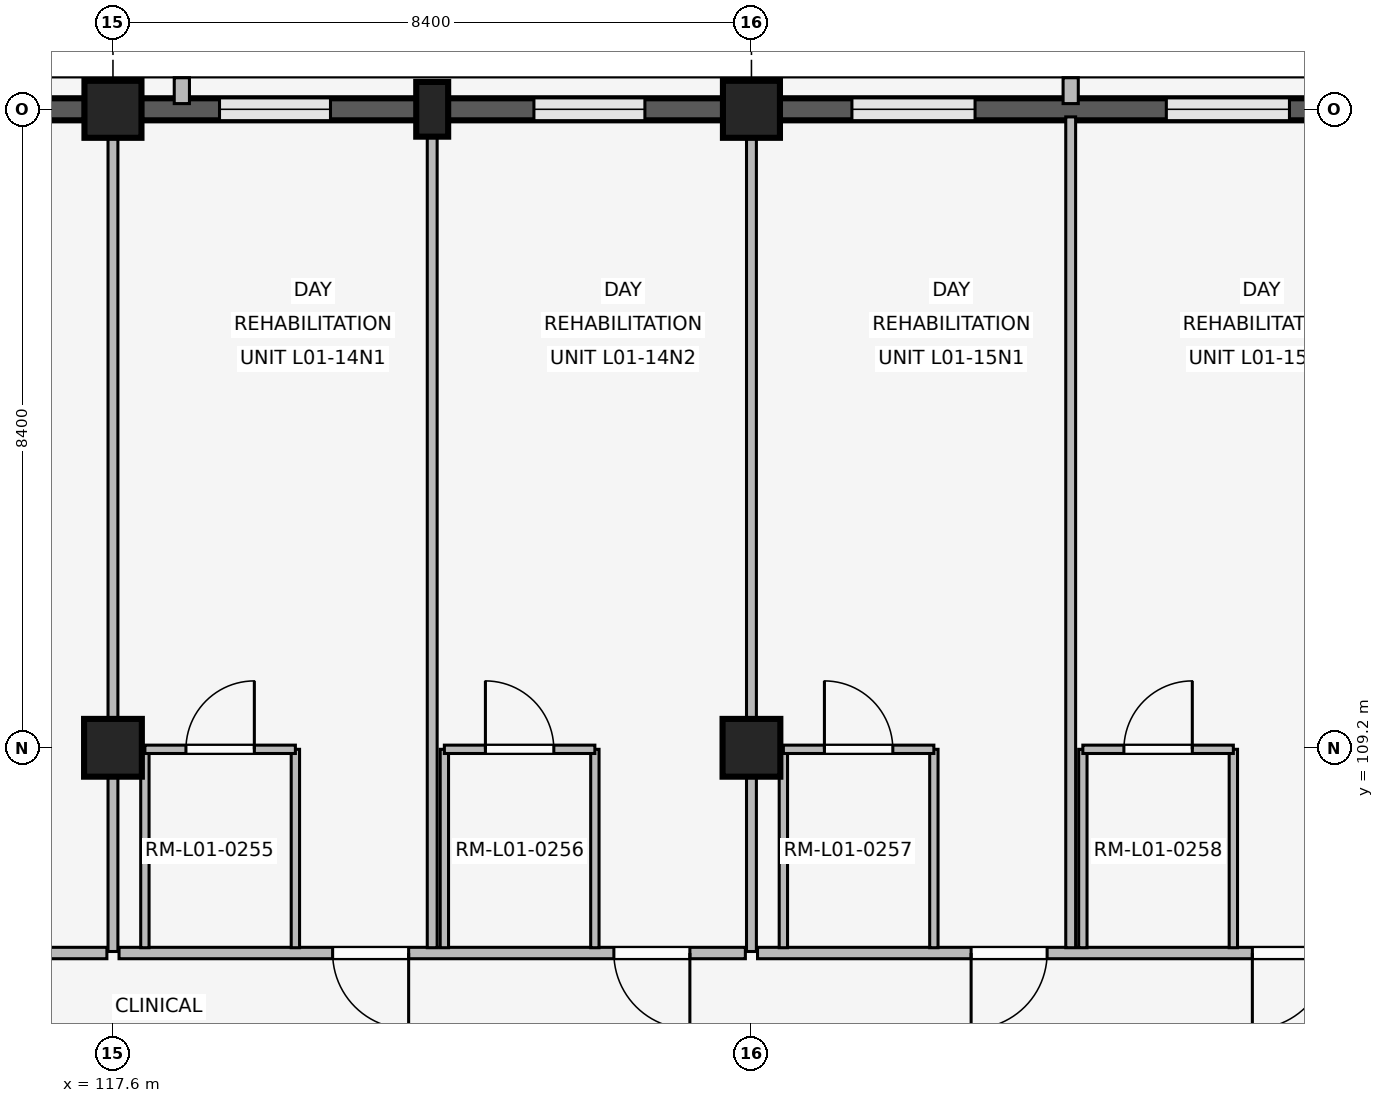
"""IFC4 building model, lengths in metres.
Left out: names, types, materials, properties, quantities, classifications, styles, units other than length and angle.
Written with IfcOpenShell. Run it as: python <this file> out.ifc"""

import sys

from ifc_helpers import new_model, si_unit, direction, frame, frame_2d, origin, origin_2d, place, context, subcontext, project, spatial, rectangle, extrude, element, fill, save


model = new_model("IFC4")
c1 = context("Model", 3, precision=1e-05, world=origin(), true_north=direction((0.0, 1.0)))
c2 = subcontext(c1, "Body", "Model", "MODEL_VIEW")
j1 = project(units=[si_unit("LENGTHUNIT", "METRE"), si_unit("PLANEANGLEUNIT", "RADIAN")], contexts=[c1])
p1 = place(None, origin())
s1 = spatial("IfcSite", under=j1, at=p1, CompositionType="ELEMENT")
p2 = place(p1, origin())
s2 = spatial("IfcBuilding", under=s1, at=p2, CompositionType="ELEMENT")
p3 = place(p2, frame((0.0, 0.0, 4.8)))
s3 = spatial("IfcBuildingStorey", under=s2, at=p3, CompositionType="ELEMENT", Elevation=4.8)
p4 = place(p3, frame((117.6, 109.2, 0.0), z_axis=(0.0, 0.0, 1.0), x_axis=(1.0, 0.0, 0.0)))
e1 = element("IfcColumn", 1, at=p4, inside=s3, PredefinedType="COLUMN", context=c2, shape_type="SweptSolid", body=[
    extrude(rectangle(XDim=0.76, YDim=0.76, at=origin_2d()), origin(), (0.0, 0.0, 1.0), 3.3),
])
p5 = place(p3, frame((117.6, 117.6, 0.0), z_axis=(0.0, 0.0, 1.0), x_axis=(1.0, 0.0, 0.0)))
e2 = element("IfcColumn", 2, at=p5, inside=s3, PredefinedType="COLUMN", context=c2, shape_type="SweptSolid", body=[
    extrude(rectangle(XDim=0.75, YDim=0.75, at=origin_2d()), origin(), (0.0, 0.0, 1.0), 3.3),
])
p6 = place(p3, frame((126.0, 109.2, 0.0), z_axis=(0.0, 0.0, 1.0), x_axis=(1.0, 0.0, 0.0)))
e3 = element("IfcColumn", 3, at=p6, inside=s3, PredefinedType="COLUMN", context=c2, shape_type="SweptSolid", body=[
    extrude(rectangle(XDim=0.76, YDim=0.76, at=origin_2d()), origin(), (0.0, 0.0, 1.0), 3.3),
])
p7 = place(p3, frame((126.0, 117.6, 0.0), z_axis=(0.0, 0.0, 1.0), x_axis=(1.0, 0.0, 0.0)))
e4 = element("IfcColumn", 4, at=p7, inside=s3, PredefinedType="COLUMN", context=c2, shape_type="SweptSolid", body=[
    extrude(rectangle(XDim=0.75, YDim=0.75, at=origin_2d()), origin(), (0.0, 0.0, 1.0), 3.3),
])
p8 = place(p3, frame((121.8, 117.6, 0.0), z_axis=(0.0, 0.0, 1.0), x_axis=(1.0, 0.0, 0.0)))
e5 = element("IfcColumn", 5, at=p8, inside=s3, PredefinedType="PILASTER", context=c2, shape_type="SweptSolid", body=[
    extrude(rectangle(XDim=0.42, YDim=0.72, at=origin_2d()), origin(), (0.0, 0.0, 1.0), 3.3),
])
p9 = place(p3, frame((109.57, 117.6, 0.0), z_axis=(0.0, 0.0, 1.0), x_axis=(1.0, 0.0, 0.0)))
e6 = element("IfcWall", 6, at=p9, inside=s3, PredefinedType="SOLIDWALL", context=c2, shape_type="SweptSolid", body=[
    extrude(rectangle(XDim=7.66, YDim=0.29, at=frame_2d((3.83, 0.0))), origin(), (0.0, 0.0, 1.0), 2.42),
])
p10 = place(p9, frame((0.952, 0.0, 0.85)))
e7 = element("IfcOpeningElement", 7, at=p10, cuts=e6, PredefinedType="OPENING", context=c2, shape_type="SweptSolid", body=[
    extrude(rectangle(XDim=1.62, YDim=0.95, at=frame_2d((0.81, 0.475))), frame((0.0, 0.155, 0.0), z_axis=(0.0, -1.0, 0.0), x_axis=(1.0, 0.0, 0.0)), (0.0, 0.0, 1.0), 0.31),
])
p11 = place(p9, frame((5.088, 0.0, 0.85)))
e8 = element("IfcOpeningElement", 8, at=p11, cuts=e6, PredefinedType="OPENING", context=c2, shape_type="SweptSolid", body=[
    extrude(rectangle(XDim=1.62, YDim=0.95, at=frame_2d((0.81, 0.475))), frame((0.0, 0.155, 0.0), z_axis=(0.0, -1.0, 0.0), x_axis=(1.0, 0.0, 0.0)), (0.0, 0.0, 1.0), 0.31),
])
p12 = place(p3, frame((117.97, 117.6, 0.0), z_axis=(0.0, 0.0, 1.0), x_axis=(1.0, 0.0, 0.0)))
e9 = element("IfcWall", 9, at=p12, inside=s3, PredefinedType="SOLIDWALL", context=c2, shape_type="SweptSolid", body=[
    extrude(rectangle(XDim=7.66, YDim=0.29, at=frame_2d((3.83, 0.0))), origin(), (0.0, 0.0, 1.0), 2.42),
])
p13 = place(p12, frame((1.032, 0.0, 0.85)))
e10 = element("IfcOpeningElement", 10, at=p13, cuts=e9, PredefinedType="OPENING", context=c2, shape_type="SweptSolid", body=[
    extrude(rectangle(XDim=1.46, YDim=0.85, at=frame_2d((0.73, 0.425))), frame((0.0, 0.155, 0.0), z_axis=(0.0, -1.0, 0.0), x_axis=(1.0, 0.0, 0.0)), (0.0, 0.0, 1.0), 0.31),
])
p14 = place(p12, frame((5.168, 0.0, 0.85)))
e11 = element("IfcOpeningElement", 11, at=p14, cuts=e9, PredefinedType="OPENING", context=c2, shape_type="SweptSolid", body=[
    extrude(rectangle(XDim=1.46, YDim=0.85, at=frame_2d((0.73, 0.425))), frame((0.0, 0.155, 0.0), z_axis=(0.0, -1.0, 0.0), x_axis=(1.0, 0.0, 0.0)), (0.0, 0.0, 1.0), 0.31),
])
p15 = place(p3, frame((118.506, 117.675, 0.0), z_axis=(0.0, 0.0, 1.0), x_axis=(0.0, 1.0, 0.0)))
e12 = element("IfcWall", 12, at=p15, inside=s3, PredefinedType="ELEMENTEDWALL", context=c2, shape_type="SweptSolid", body=[
    extrude(rectangle(XDim=0.34, YDim=0.2, at=frame_2d((0.17, 0.0))), origin(), (0.0, 0.0, 1.0), 2.4),
])
p16 = place(p3, frame((126.37, 117.6, 0.0), z_axis=(0.0, 0.0, 1.0), x_axis=(1.0, 0.0, 0.0)))
e13 = element("IfcWall", 13, at=p16, inside=s3, PredefinedType="SOLIDWALL", context=c2, shape_type="SweptSolid", body=[
    extrude(rectangle(XDim=7.66, YDim=0.29, at=frame_2d((3.83, 0.0))), origin(), (0.0, 0.0, 1.0), 2.42),
])
p17 = place(p16, frame((0.952, 0.0, 0.85)))
e14 = element("IfcOpeningElement", 14, at=p17, cuts=e13, PredefinedType="OPENING", context=c2, shape_type="SweptSolid", body=[
    extrude(rectangle(XDim=1.62, YDim=0.95, at=frame_2d((0.81, 0.475))), frame((0.0, 0.155, 0.0), z_axis=(0.0, -1.0, 0.0), x_axis=(1.0, 0.0, 0.0)), (0.0, 0.0, 1.0), 0.31),
])
p18 = place(p16, frame((5.088, 0.0, 0.85)))
e15 = element("IfcOpeningElement", 15, at=p18, cuts=e13, PredefinedType="OPENING", context=c2, shape_type="SweptSolid", body=[
    extrude(rectangle(XDim=1.62, YDim=0.95, at=frame_2d((0.81, 0.475))), frame((0.0, 0.155, 0.0), z_axis=(0.0, -1.0, 0.0), x_axis=(1.0, 0.0, 0.0)), (0.0, 0.0, 1.0), 0.31),
])
p19 = place(p3, frame((130.2, 117.675, 0.0), z_axis=(0.0, 0.0, 1.0), x_axis=(0.0, 1.0, 0.0)))
e16 = element("IfcWall", 16, at=p19, inside=s3, PredefinedType="ELEMENTEDWALL", context=c2, shape_type="SweptSolid", body=[
    extrude(rectangle(XDim=0.34, YDim=0.2, at=frame_2d((0.17, 0.0))), origin(), (0.0, 0.0, 1.0), 2.4),
])
p20 = place(p3, frame((117.52, 106.5, 0.0), z_axis=(0.0, 0.0, 1.0), x_axis=(-1.0, 0.0, 0.0)))
e17 = element("IfcWall", 17, at=p20, inside=s3, PredefinedType="PARTITIONING", context=c2, shape_type="SweptSolid", body=[
    extrude(rectangle(XDim=8.24, YDim=0.15, at=frame_2d((4.12, 0.0))), origin(), (0.0, 0.0, 1.0), 2.4),
])
p21 = place(p20, frame((3.57, 0.0, 0.0)))
e18 = element("IfcOpeningElement", 18, at=p21, cuts=e17, PredefinedType="OPENING", context=c2, shape_type="SweptSolid", body=[
    extrude(rectangle(XDim=1.1, YDim=2.2, at=frame_2d((0.55, 1.1))), frame((0.0, 0.085, 0.0), z_axis=(0.0, -1.0, 0.0), x_axis=(1.0, 0.0, 0.0)), (0.0, 0.0, 1.0), 0.17),
])
p22 = place(p3, frame((117.6, 106.52, 0.0), z_axis=(0.0, 0.0, 1.0), x_axis=(0.0, 1.0, 0.0)))
e19 = element("IfcWall", 19, at=p22, inside=s3, PredefinedType="PARTITIONING", context=c2, shape_type="SweptSolid", body=[
    extrude(rectangle(XDim=10.94, YDim=0.13, at=frame_2d((5.47, 0.0))), origin(), (0.0, 0.0, 1.0), 2.4),
])
p23 = place(p3, frame((125.92, 106.5, 0.0), z_axis=(0.0, 0.0, 1.0), x_axis=(-1.0, 0.0, 0.0)))
e20 = element("IfcWall", 20, at=p23, inside=s3, PredefinedType="PARTITIONING", context=c2, shape_type="SweptSolid", body=[
    extrude(rectangle(XDim=8.24, YDim=0.15, at=frame_2d((4.12, 0.0))), origin(), (0.0, 0.0, 1.0), 2.4),
])
p24 = place(p23, frame((0.73, 0.0, 0.0)))
e21 = element("IfcOpeningElement", 21, at=p24, cuts=e20, PredefinedType="OPENING", context=c2, shape_type="SweptSolid", body=[
    extrude(rectangle(XDim=1.0, YDim=2.15, at=frame_2d((0.5, 1.075))), frame((0.0, 0.085, 0.0), z_axis=(0.0, -1.0, 0.0), x_axis=(1.0, 0.0, 0.0)), (0.0, 0.0, 1.0), 0.17),
])
p25 = place(p23, frame((4.43, 0.0, 0.0)))
e22 = element("IfcOpeningElement", 22, at=p25, cuts=e20, PredefinedType="OPENING", context=c2, shape_type="SweptSolid", body=[
    extrude(rectangle(XDim=1.0, YDim=2.15, at=frame_2d((0.5, 1.075))), frame((0.0, 0.085, 0.0), z_axis=(0.0, -1.0, 0.0), x_axis=(1.0, 0.0, 0.0)), (0.0, 0.0, 1.0), 0.17),
])
p26 = place(p3, frame((121.8, 106.57, 0.0), z_axis=(0.0, 0.0, 1.0), x_axis=(0.0, 1.0, 0.0)))
e23 = element("IfcWall", 23, at=p26, inside=s3, PredefinedType="PARTITIONING", context=c2, shape_type="SweptSolid", body=[
    extrude(rectangle(XDim=10.93, YDim=0.13, at=frame_2d((5.465, 0.0))), origin(), (0.0, 0.0, 1.0), 2.4),
])
for number, where, z_axis, x_axis in (
    (24, (118.02, 106.57, 0.0), (0.0, 0.0, 1.0), (0.0, 1.0, 0.0)),
    (25, (120.0, 106.57, 0.0), (0.0, 0.0, 1.0), (0.0, 1.0, 0.0)),
):
    element("IfcWall", number, at=place(p3, frame(where, z_axis=z_axis, x_axis=x_axis)), inside=s3, PredefinedType="PARTITIONING", context=c2, shape_type="SweptSolid", body=[
        extrude(rectangle(XDim=2.61, YDim=0.11, at=frame_2d((1.305, 0.0))), origin(), (0.0, 0.0, 1.0), 2.4),
    ])
p27 = place(p3, frame((118.02, 109.18, 0.0), z_axis=(0.0, 0.0, 1.0), x_axis=(1.0, 0.0, 0.0)))
e26 = element("IfcWall", 26, at=p27, inside=s3, PredefinedType="PARTITIONING", context=c2, shape_type="SweptSolid", body=[
    extrude(rectangle(XDim=1.98, YDim=0.11, at=frame_2d((0.99, 0.0))), origin(), (0.0, 0.0, 1.0), 2.4),
])
p28 = place(p27, frame((0.54, 0.0, 0.0)))
e27 = element("IfcOpeningElement", 27, at=p28, cuts=e26, PredefinedType="OPENING", context=c2, shape_type="SweptSolid", body=[
    extrude(rectangle(XDim=0.9, YDim=2.1, at=frame_2d((0.45, 1.05))), frame((0.0, 0.065, 0.0), z_axis=(0.0, -1.0, 0.0), x_axis=(1.0, 0.0, 0.0)), (0.0, 0.0, 1.0), 0.13),
])
for number, where, z_axis, x_axis in (
    (28, (121.96, 106.57, 0.0), (0.0, 0.0, 1.0), (0.0, 1.0, 0.0)),
    (29, (123.94, 106.57, 0.0), (0.0, 0.0, 1.0), (0.0, 1.0, 0.0)),
):
    element("IfcWall", number, at=place(p3, frame(where, z_axis=z_axis, x_axis=x_axis)), inside=s3, PredefinedType="PARTITIONING", context=c2, shape_type="SweptSolid", body=[
        extrude(rectangle(XDim=2.61, YDim=0.11, at=frame_2d((1.305, 0.0))), origin(), (0.0, 0.0, 1.0), 2.4),
    ])
p29 = place(p3, frame((121.96, 109.18, 0.0), z_axis=(0.0, 0.0, 1.0), x_axis=(1.0, 0.0, 0.0)))
e30 = element("IfcWall", 30, at=p29, inside=s3, PredefinedType="PARTITIONING", context=c2, shape_type="SweptSolid", body=[
    extrude(rectangle(XDim=1.98, YDim=0.11, at=frame_2d((0.99, 0.0))), origin(), (0.0, 0.0, 1.0), 2.4),
])
p30 = place(p29, frame((0.54, 0.0, 0.0)))
e31 = element("IfcOpeningElement", 31, at=p30, cuts=e30, PredefinedType="OPENING", context=c2, shape_type="SweptSolid", body=[
    extrude(rectangle(XDim=0.9, YDim=2.1, at=frame_2d((0.45, 1.05))), frame((0.0, 0.065, 0.0), z_axis=(0.0, -1.0, 0.0), x_axis=(1.0, 0.0, 0.0)), (0.0, 0.0, 1.0), 0.13),
])
p31 = place(p3, frame((126.0, 106.52, 0.0), z_axis=(0.0, 0.0, 1.0), x_axis=(0.0, 1.0, 0.0)))
e32 = element("IfcWall", 32, at=p31, inside=s3, PredefinedType="PARTITIONING", context=c2, shape_type="SweptSolid", body=[
    extrude(rectangle(XDim=10.94, YDim=0.13, at=frame_2d((5.47, 0.0))), origin(), (0.0, 0.0, 1.0), 2.4),
])
p32 = place(p3, frame((134.32, 106.5, 0.0), z_axis=(0.0, 0.0, 1.0), x_axis=(-1.0, 0.0, 0.0)))
e33 = element("IfcWall", 33, at=p32, inside=s3, PredefinedType="PARTITIONING", context=c2, shape_type="SweptSolid", body=[
    extrude(rectangle(XDim=8.24, YDim=0.15, at=frame_2d((4.12, 0.0))), origin(), (0.0, 0.0, 1.0), 2.4),
])
p33 = place(p32, frame((0.73, 0.0, 0.0)))
e34 = element("IfcOpeningElement", 34, at=p33, cuts=e33, PredefinedType="OPENING", context=c2, shape_type="SweptSolid", body=[
    extrude(rectangle(XDim=1.0, YDim=2.15, at=frame_2d((0.5, 1.075))), frame((0.0, 0.085, 0.0), z_axis=(0.0, -1.0, 0.0), x_axis=(1.0, 0.0, 0.0)), (0.0, 0.0, 1.0), 0.17),
])
p34 = place(p32, frame((4.43, 0.0, 0.0)))
e35 = element("IfcOpeningElement", 35, at=p34, cuts=e33, PredefinedType="OPENING", context=c2, shape_type="SweptSolid", body=[
    extrude(rectangle(XDim=1.0, YDim=2.15, at=frame_2d((0.5, 1.075))), frame((0.0, 0.085, 0.0), z_axis=(0.0, -1.0, 0.0), x_axis=(1.0, 0.0, 0.0)), (0.0, 0.0, 1.0), 0.17),
])
p35 = place(p3, frame((130.2, 106.57, 0.0), z_axis=(0.0, 0.0, 1.0), x_axis=(0.0, 1.0, 0.0)))
e36 = element("IfcWall", 36, at=p35, inside=s3, PredefinedType="PARTITIONING", context=c2, shape_type="SweptSolid", body=[
    extrude(rectangle(XDim=10.93, YDim=0.13, at=frame_2d((5.465, 0.0))), origin(), (0.0, 0.0, 1.0), 2.4),
])
for number, where, z_axis, x_axis in (
    (37, (126.42, 106.57, 0.0), (0.0, 0.0, 1.0), (0.0, 1.0, 0.0)),
    (38, (128.4, 106.57, 0.0), (0.0, 0.0, 1.0), (0.0, 1.0, 0.0)),
):
    element("IfcWall", number, at=place(p3, frame(where, z_axis=z_axis, x_axis=x_axis)), inside=s3, PredefinedType="PARTITIONING", context=c2, shape_type="SweptSolid", body=[
        extrude(rectangle(XDim=2.61, YDim=0.11, at=frame_2d((1.305, 0.0))), origin(), (0.0, 0.0, 1.0), 2.4),
    ])
p36 = place(p3, frame((126.42, 109.18, 0.0), z_axis=(0.0, 0.0, 1.0), x_axis=(1.0, 0.0, 0.0)))
e39 = element("IfcWall", 39, at=p36, inside=s3, PredefinedType="PARTITIONING", context=c2, shape_type="SweptSolid", body=[
    extrude(rectangle(XDim=1.98, YDim=0.11, at=frame_2d((0.99, 0.0))), origin(), (0.0, 0.0, 1.0), 2.4),
])
p37 = place(p36, frame((0.54, 0.0, 0.0)))
e40 = element("IfcOpeningElement", 40, at=p37, cuts=e39, PredefinedType="OPENING", context=c2, shape_type="SweptSolid", body=[
    extrude(rectangle(XDim=0.9, YDim=2.1, at=frame_2d((0.45, 1.05))), frame((0.0, 0.065, 0.0), z_axis=(0.0, -1.0, 0.0), x_axis=(1.0, 0.0, 0.0)), (0.0, 0.0, 1.0), 0.13),
])
for number, where, z_axis, x_axis in (
    (41, (130.36, 106.57, 0.0), (0.0, 0.0, 1.0), (0.0, 1.0, 0.0)),
    (42, (132.34, 106.57, 0.0), (0.0, 0.0, 1.0), (0.0, 1.0, 0.0)),
):
    element("IfcWall", number, at=place(p3, frame(where, z_axis=z_axis, x_axis=x_axis)), inside=s3, PredefinedType="PARTITIONING", context=c2, shape_type="SweptSolid", body=[
        extrude(rectangle(XDim=2.61, YDim=0.11, at=frame_2d((1.305, 0.0))), origin(), (0.0, 0.0, 1.0), 2.4),
    ])
p38 = place(p3, frame((130.36, 109.18, 0.0), z_axis=(0.0, 0.0, 1.0), x_axis=(1.0, 0.0, 0.0)))
e43 = element("IfcWall", 43, at=p38, inside=s3, PredefinedType="PARTITIONING", context=c2, shape_type="SweptSolid", body=[
    extrude(rectangle(XDim=1.98, YDim=0.11, at=frame_2d((0.99, 0.0))), origin(), (0.0, 0.0, 1.0), 2.4),
])
p39 = place(p38, frame((0.54, 0.0, 0.0)))
e44 = element("IfcOpeningElement", 44, at=p39, cuts=e43, PredefinedType="OPENING", context=c2, shape_type="SweptSolid", body=[
    extrude(rectangle(XDim=0.9, YDim=2.1, at=frame_2d((0.45, 1.05))), frame((0.0, 0.065, 0.0), z_axis=(0.0, -1.0, 0.0), x_axis=(1.0, 0.0, 0.0)), (0.0, 0.0, 1.0), 0.13),
])
p40 = place(p13, origin())
e45 = element("IfcWindow", 45, at=p40, inside=s3, PartitioningType="SINGLE_PANEL", PredefinedType="WINDOW", context=c2, shape_type="SweptSolid", body=[
    extrude(rectangle(XDim=1.46, YDim=0.85, at=frame_2d((0.73, 0.425))), frame((0.0, 0.03, 0.0), z_axis=(0.0, -1.0, 0.0), x_axis=(1.0, 0.0, 0.0)), (0.0, 0.0, 1.0), 0.06),
])
fill(e10, e45)
p41 = place(p14, origin())
e46 = element("IfcWindow", 46, at=p41, inside=s3, PartitioningType="SINGLE_PANEL", PredefinedType="WINDOW", context=c2, shape_type="SweptSolid", body=[
    extrude(rectangle(XDim=1.46, YDim=0.85, at=frame_2d((0.73, 0.425))), frame((0.0, 0.03, 0.0), z_axis=(0.0, -1.0, 0.0), x_axis=(1.0, 0.0, 0.0)), (0.0, 0.0, 1.0), 0.06),
])
fill(e11, e46)
p42 = place(p17, origin())
e47 = element("IfcWindow", 47, at=p42, inside=s3, PartitioningType="SINGLE_PANEL", PredefinedType="WINDOW", context=c2, shape_type="SweptSolid", body=[
    extrude(rectangle(XDim=1.62, YDim=0.95, at=frame_2d((0.81, 0.475))), frame((0.0, 0.03, 0.0), z_axis=(0.0, -1.0, 0.0), x_axis=(1.0, 0.0, 0.0)), (0.0, 0.0, 1.0), 0.06),
])
fill(e14, e47)
p43 = place(p18, origin())
e48 = element("IfcWindow", 48, at=p43, inside=s3, PartitioningType="SINGLE_PANEL", PredefinedType="WINDOW", context=c2, shape_type="SweptSolid", body=[
    extrude(rectangle(XDim=1.62, YDim=0.95, at=frame_2d((0.81, 0.475))), frame((0.0, 0.03, 0.0), z_axis=(0.0, -1.0, 0.0), x_axis=(1.0, 0.0, 0.0)), (0.0, 0.0, 1.0), 0.06),
])
fill(e15, e48)
p44 = place(p24, origin())
e49 = element("IfcDoor", 49, at=p44, inside=s3, OperationType="SINGLE_SWING_LEFT", PredefinedType="DOOR", context=c2, shape_type="SweptSolid", body=[
    extrude(rectangle(XDim=1.0, YDim=2.15, at=frame_2d((0.5, 1.075))), frame((0.0, 0.025, 0.0), z_axis=(0.0, -1.0, 0.0), x_axis=(1.0, 0.0, 0.0)), (0.0, 0.0, 1.0), 0.05),
])
fill(e21, e49)
p45 = place(p25, origin())
e50 = element("IfcDoor", 50, at=p45, inside=s3, OperationType="SINGLE_SWING_LEFT", PredefinedType="DOOR", context=c2, shape_type="SweptSolid", body=[
    extrude(rectangle(XDim=1.0, YDim=2.15, at=frame_2d((0.5, 1.075))), frame((0.0, 0.025, 0.0), z_axis=(0.0, -1.0, 0.0), x_axis=(1.0, 0.0, 0.0)), (0.0, 0.0, 1.0), 0.05),
])
fill(e22, e50)
p46 = place(p28, origin())
e51 = element("IfcDoor", 51, at=p46, inside=s3, OperationType="SINGLE_SWING_RIGHT", PredefinedType="DOOR", context=c2, shape_type="SweptSolid", body=[
    extrude(rectangle(XDim=0.9, YDim=2.1, at=frame_2d((0.45, 1.05))), frame((0.0, 0.025, 0.0), z_axis=(0.0, -1.0, 0.0), x_axis=(1.0, 0.0, 0.0)), (0.0, 0.0, 1.0), 0.05),
])
fill(e27, e51)
p47 = place(p30, origin())
e52 = element("IfcDoor", 52, at=p47, inside=s3, OperationType="SINGLE_SWING_LEFT", PredefinedType="DOOR", context=c2, shape_type="SweptSolid", body=[
    extrude(rectangle(XDim=0.9, YDim=2.1, at=frame_2d((0.45, 1.05))), frame((0.0, 0.025, 0.0), z_axis=(0.0, -1.0, 0.0), x_axis=(1.0, 0.0, 0.0)), (0.0, 0.0, 1.0), 0.05),
])
fill(e31, e52)
p48 = place(p33, origin())
e53 = element("IfcDoor", 53, at=p48, inside=s3, OperationType="SINGLE_SWING_RIGHT", PredefinedType="DOOR", context=c2, shape_type="SweptSolid", body=[
    extrude(rectangle(XDim=1.0, YDim=2.15, at=frame_2d((0.5, 1.075))), frame((0.0, 0.025, 0.0), z_axis=(0.0, -1.0, 0.0), x_axis=(1.0, 0.0, 0.0)), (0.0, 0.0, 1.0), 0.05),
])
fill(e34, e53)
p49 = place(p34, origin())
e54 = element("IfcDoor", 54, at=p49, inside=s3, OperationType="SINGLE_SWING_RIGHT", PredefinedType="DOOR", context=c2, shape_type="SweptSolid", body=[
    extrude(rectangle(XDim=1.0, YDim=2.15, at=frame_2d((0.5, 1.075))), frame((0.0, 0.025, 0.0), z_axis=(0.0, -1.0, 0.0), x_axis=(1.0, 0.0, 0.0)), (0.0, 0.0, 1.0), 0.05),
])
fill(e35, e54)
p50 = place(p37, origin())
e55 = element("IfcDoor", 55, at=p50, inside=s3, OperationType="SINGLE_SWING_LEFT", PredefinedType="DOOR", context=c2, shape_type="SweptSolid", body=[
    extrude(rectangle(XDim=0.9, YDim=2.1, at=frame_2d((0.45, 1.05))), frame((0.0, 0.025, 0.0), z_axis=(0.0, -1.0, 0.0), x_axis=(1.0, 0.0, 0.0)), (0.0, 0.0, 1.0), 0.05),
])
fill(e40, e55)
p51 = place(p39, origin())
e56 = element("IfcDoor", 56, at=p51, inside=s3, OperationType="SINGLE_SWING_RIGHT", PredefinedType="DOOR", context=c2, shape_type="SweptSolid", body=[
    extrude(rectangle(XDim=0.9, YDim=2.1, at=frame_2d((0.45, 1.05))), frame((0.0, 0.025, 0.0), z_axis=(0.0, -1.0, 0.0), x_axis=(1.0, 0.0, 0.0)), (0.0, 0.0, 1.0), 0.05),
])
fill(e44, e56)
save(model, sys.argv[1])
